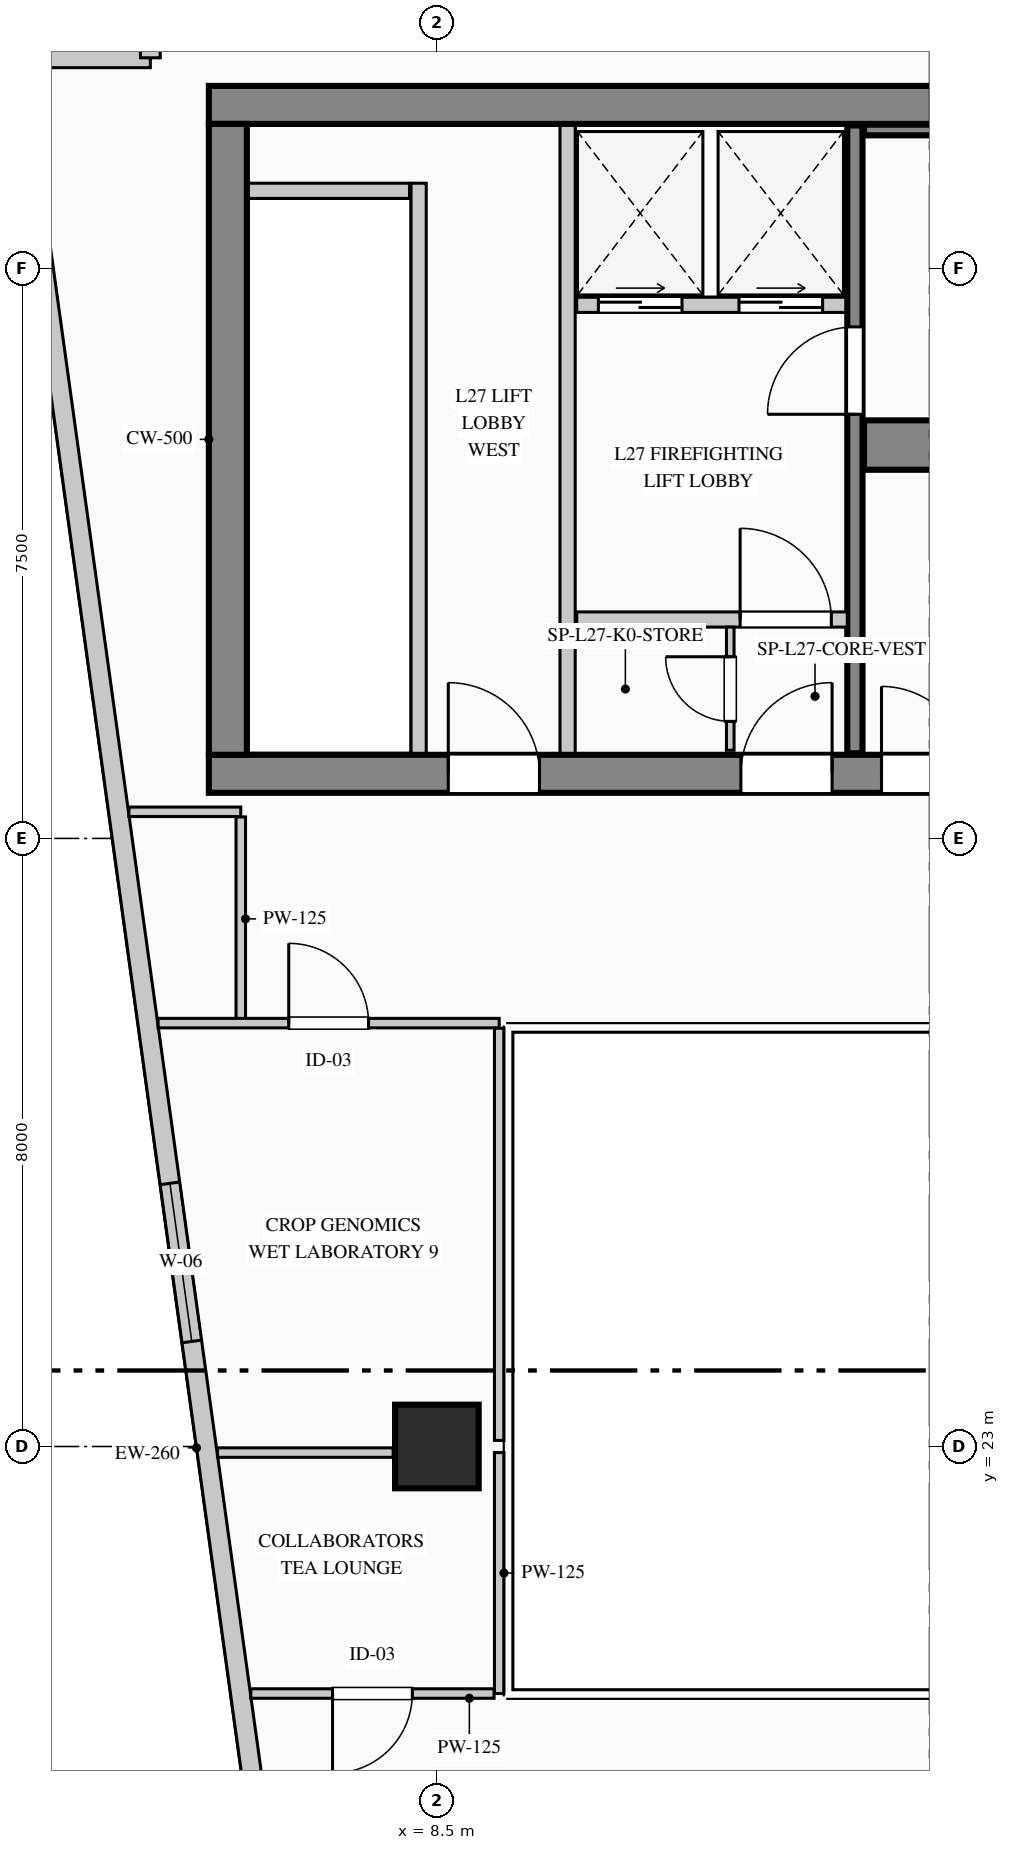
"""IFC4 building model, lengths in metres.
Left out: names, types, materials, properties, quantities, classifications, styles, units other than length and angle.
Written with IfcOpenShell. Run it as: python <this file> out.ifc"""

import sys

from ifc_helpers import new_model, si_unit, direction, frame, frame_2d, origin, origin_2d, place, context, subcontext, project, spatial, rectangle, extrude, element, fill, save


model = new_model("IFC4")
c1 = context("Model", 3, precision=1e-05, world=origin(), true_north=direction((0.0, 1.0)))
c2 = subcontext(c1, "Body", "Model", "MODEL_VIEW")
j1 = project(units=[si_unit("LENGTHUNIT", "METRE"), si_unit("PLANEANGLEUNIT", "RADIAN")], contexts=[c1])
p1 = place(None, origin())
s1 = spatial("IfcSite", under=j1, at=p1, CompositionType="ELEMENT")
p2 = place(p1, origin())
s2 = spatial("IfcBuilding", under=s1, at=p2, CompositionType="ELEMENT")
p3 = place(p2, frame((0.0, 0.0, 119.3)))
s3 = spatial("IfcBuildingStorey", under=s2, at=p3, CompositionType="ELEMENT", Elevation=119.3)
p4 = place(p3, frame((5.5, 40.65, 0.0), z_axis=(0.0, 0.0, 1.0), x_axis=(1.0, 0.0, 0.0)))
e1 = element("IfcWall", 1, at=p4, inside=s3, PredefinedType="SHEAR", context=c2, shape_type="SweptSolid", body=[
    extrude(rectangle(XDim=17.85, YDim=0.5, at=frame_2d((8.925, 0.0))), origin(), (0.0, 0.0, 1.0), 3.95),
])
p5 = place(p4, frame((15.945, 0.0, 0.0)))
e2 = element("IfcOpeningElement", 2, at=p5, cuts=e1, PredefinedType="OPENING", context=c2, shape_type="SweptSolid", body=[
    extrude(rectangle(XDim=1.18, YDim=2.25, at=frame_2d((0.59, 1.125))), frame((0.0, 0.26, 0.0), z_axis=(0.0, -1.0, 0.0), x_axis=(1.0, 0.0, 0.0)), (0.0, 0.0, 1.0), 0.52),
])
p6 = place(p3, frame((5.5, 31.85, 0.0), z_axis=(0.0, 0.0, 1.0), x_axis=(1.0, 0.0, 0.0)))
e3 = element("IfcWall", 3, at=p6, inside=s3, PredefinedType="SHEAR", context=c2, shape_type="SweptSolid", body=[
    extrude(rectangle(XDim=17.85, YDim=0.5, at=frame_2d((8.925, 0.0))), origin(), (0.0, 0.0, 1.0), 3.95),
])
p7 = place(p6, frame((3.15, 0.0, 0.0)))
e4 = element("IfcOpeningElement", 4, at=p7, cuts=e3, PredefinedType="OPENING", context=c2, shape_type="SweptSolid", body=[
    extrude(rectangle(XDim=1.2, YDim=2.2, at=frame_2d((0.6, 1.1))), frame((0.0, 0.26, 0.0), z_axis=(0.0, -1.0, 0.0), x_axis=(1.0, 0.0, 0.0)), (0.0, 0.0, 1.0), 0.52),
])
p8 = place(p6, frame((7.0, 0.0, 0.0)))
e5 = element("IfcOpeningElement", 5, at=p8, cuts=e3, PredefinedType="OPENING", context=c2, shape_type="SweptSolid", body=[
    extrude(rectangle(XDim=1.2, YDim=2.2, at=frame_2d((0.6, 1.1))), frame((0.0, 0.26, 0.0), z_axis=(0.0, -1.0, 0.0), x_axis=(1.0, 0.0, 0.0)), (0.0, 0.0, 1.0), 0.52),
])
p9 = place(p6, frame((8.85, 0.0, 0.0)))
e6 = element("IfcOpeningElement", 6, at=p9, cuts=e3, PredefinedType="OPENING", context=c2, shape_type="SweptSolid", body=[
    extrude(rectangle(XDim=1.15, YDim=2.2, at=frame_2d((0.575, 1.1))), frame((0.0, 0.26, 0.0), z_axis=(0.0, -1.0, 0.0), x_axis=(1.0, 0.0, 0.0)), (0.0, 0.0, 1.0), 0.52),
])
p10 = place(p6, frame((15.95, 0.0, 0.0)))
e7 = element("IfcOpeningElement", 7, at=p10, cuts=e3, PredefinedType="OPENING", context=c2, shape_type="SweptSolid", body=[
    extrude(rectangle(XDim=1.2, YDim=2.2, at=frame_2d((0.6, 1.1))), frame((0.0, 0.26, 0.0), z_axis=(0.0, -1.0, 0.0), x_axis=(1.0, 0.0, 0.0)), (0.0, 0.0, 1.0), 0.52),
])
p11 = place(p3, frame((5.75, 32.1, 0.0), z_axis=(0.0, 0.0, 1.0), x_axis=(0.0, 1.0, 0.0)))
e8 = element("IfcWall", 8, at=p11, inside=s3, PredefinedType="SHEAR", context=c2, shape_type="SweptSolid", body=[
    extrude(rectangle(XDim=8.3, YDim=0.5, at=frame_2d((4.15, 0.0))), origin(), (0.0, 0.0, 1.0), 3.95),
])
p12 = place(p3, frame((14.0, 32.12, 0.0), z_axis=(0.0, 0.0, 1.0), x_axis=(0.0, 1.0, 0.0)))
e9 = element("IfcWall", 9, at=p12, inside=s3, PredefinedType="SHEAR", context=c2, shape_type="SweptSolid", body=[
    extrude(rectangle(XDim=8.26, YDim=0.2, at=frame_2d((4.13, 0.0))), origin(), (0.0, 0.0, 1.0), 3.95),
])
p13 = place(p12, frame((4.46, 0.0, 0.0)))
e10 = element("IfcOpeningElement", 10, at=p13, cuts=e9, PredefinedType="OPENING", context=c2, shape_type="SweptSolid", body=[
    extrude(rectangle(XDim=1.15, YDim=2.2, at=frame_2d((0.575, 1.1))), frame((0.0, 0.11, 0.0), z_axis=(0.0, -1.0, 0.0), x_axis=(1.0, 0.0, 0.0)), (0.0, 0.0, 1.0), 0.22),
])
p14 = place(p3, frame((14.12, 36.175, 0.0), z_axis=(0.0, 0.0, 1.0), x_axis=(1.0, 0.0, 0.0)))
e11 = element("IfcWall", 11, at=p14, inside=s3, PredefinedType="SHEAR", context=c2, shape_type="SweptSolid", body=[
    extrude(rectangle(XDim=7.01, YDim=0.65, at=frame_2d((3.505, 0.0))), origin(), (0.0, 0.0, 1.0), 3.95),
])
p15 = place(p3, frame((14.12, 40.32, 0.0), z_axis=(0.0, 0.0, 1.0), x_axis=(1.0, 0.0, 0.0)))
e12 = element("IfcWall", 12, at=p15, inside=s3, PredefinedType="SHEAR", context=c2, shape_type="SweptSolid", body=[
    extrude(rectangle(XDim=7.01, YDim=0.14, at=frame_2d((3.505, 0.0))), origin(), (0.0, 0.0, 1.0), 3.95),
])
p16 = place(p3, frame((8.5, 23.0, 0.0), z_axis=(0.0, 0.0, 1.0), x_axis=(1.0, 0.0, 0.0)))
e13 = element("IfcColumn", 13, at=p16, inside=s3, PredefinedType="COLUMN", context=c2, shape_type="SweptSolid", body=[
    extrude(rectangle(XDim=1.1, YDim=1.1, at=origin_2d()), origin(), (0.0, 0.0, 1.0), 3.95),
])
p17 = place(p3, frame((7.993, 4.73, 0.0), z_axis=(0.0, 0.0, 1.0), x_axis=(-0.136989009016, 0.990572567462, 0.0)))
e14 = element("IfcWall", 14, at=p17, inside=s3, PredefinedType="STANDARD", context=c2, shape_type="SweptSolid", body=[
    extrude(rectangle(XDim=36.888, YDim=0.26, at=frame_2d((18.444, 0.0))), origin(), (0.0, 0.0, 1.0), 3.69),
])
p18 = place(p17, frame((19.839, 0.0, 0.9)))
e15 = element("IfcOpeningElement", 15, at=p18, cuts=e14, PredefinedType="OPENING", context=c2, shape_type="SweptSolid", body=[
    extrude(rectangle(XDim=2.1, YDim=2.0, at=frame_2d((1.05, 1.0))), frame((0.0, 0.14, 0.0), z_axis=(0.0, -1.0, 0.0), x_axis=(1.0, 0.0, 0.0)), (0.0, 0.0, 1.0), 0.28),
])
p19 = place(p3, frame((2.94, 41.27, 0.0), z_axis=(0.0, 0.0, 1.0), x_axis=(1.0, 0.0, 0.0)))
e16 = element("IfcWall", 16, at=p19, inside=s3, PredefinedType="STANDARD", context=c2, shape_type="SweptSolid", body=[
    extrude(rectangle(XDim=1.79, YDim=0.26, at=frame_2d((0.895, 0.0))), origin(), (0.0, 0.0, 1.0), 3.69),
])
p20 = place(p3, frame((4.73, 41.27, 0.0), z_axis=(0.0, 0.0, 1.0), x_axis=(0.0, 1.0, 0.0)))
e17 = element("IfcWall", 17, at=p20, inside=s3, PredefinedType="STANDARD", context=c2, shape_type="SweptSolid", body=[
    extrude(rectangle(XDim=2.1, YDim=0.26, at=frame_2d((1.05, 0.0))), origin(), (0.0, 0.0, 1.0), 3.69),
])
p21 = place(p3, frame((8.26, 32.12, 0.0), z_axis=(0.0, 0.0, 1.0), x_axis=(0.0, 1.0, 0.0)))
e18 = element("IfcWall", 18, at=p21, inside=s3, PredefinedType="PARTITIONING", context=c2, shape_type="SweptSolid", body=[
    extrude(rectangle(XDim=7.5, YDim=0.2, at=frame_2d((3.75, 0.0))), origin(), (0.0, 0.0, 1.0), 3.69),
])
p22 = place(p3, frame((6.02, 39.52, 0.0), z_axis=(0.0, 0.0, 1.0), x_axis=(1.0, 0.0, 0.0)))
e19 = element("IfcWall", 19, at=p22, inside=s3, PredefinedType="PARTITIONING", context=c2, shape_type="SweptSolid", body=[
    extrude(rectangle(XDim=2.12, YDim=0.2, at=frame_2d((1.06, 0.0))), origin(), (0.0, 0.0, 1.0), 3.69),
])
p23 = place(p3, frame((10.22, 32.12, 0.0), z_axis=(0.0, 0.0, 1.0), x_axis=(0.0, 1.0, 0.0)))
e20 = element("IfcWall", 20, at=p23, inside=s3, PredefinedType="PARTITIONING", context=c2, shape_type="SweptSolid", body=[
    extrude(rectangle(XDim=8.26, YDim=0.2, at=frame_2d((4.13, 0.0))), origin(), (0.0, 0.0, 1.0), 3.69),
])
p24 = place(p3, frame((10.34, 38.02, 0.0), z_axis=(0.0, 0.0, 1.0), x_axis=(1.0, 0.0, 0.0)))
e21 = element("IfcWall", 21, at=p24, inside=s3, PredefinedType="PARTITIONING", context=c2, shape_type="SweptSolid", body=[
    extrude(rectangle(XDim=3.54, YDim=0.2, at=frame_2d((1.77, 0.0))), origin(), (0.0, 0.0, 1.0), 3.69),
])
p25 = place(p24, frame((0.285, 0.0, 0.0)))
e22 = element("IfcOpeningElement", 22, at=p25, cuts=e21, PredefinedType="OPENING", context=c2, shape_type="SweptSolid", body=[
    extrude(rectangle(XDim=1.1, YDim=2.2, at=frame_2d((0.55, 1.1))), frame((0.0, 0.11, 0.0), z_axis=(0.0, -1.0, 0.0), x_axis=(1.0, 0.0, 0.0)), (0.0, 0.0, 1.0), 0.22),
])
p26 = place(p24, frame((2.135, 0.0, 0.0)))
e23 = element("IfcOpeningElement", 23, at=p26, cuts=e21, PredefinedType="OPENING", context=c2, shape_type="SweptSolid", body=[
    extrude(rectangle(XDim=1.1, YDim=2.2, at=frame_2d((0.55, 1.1))), frame((0.0, 0.11, 0.0), z_axis=(0.0, -1.0, 0.0), x_axis=(1.0, 0.0, 0.0)), (0.0, 0.0, 1.0), 0.22),
])
p27 = place(p3, frame((10.34, 33.88, 0.0), z_axis=(0.0, 0.0, 1.0), x_axis=(1.0, 0.0, 0.0)))
e24 = element("IfcWall", 24, at=p27, inside=s3, PredefinedType="PARTITIONING", context=c2, shape_type="SweptSolid", body=[
    extrude(rectangle(XDim=3.56, YDim=0.2, at=frame_2d((1.78, 0.0))), origin(), (0.0, 0.0, 1.0), 3.69),
])
p28 = place(p27, frame((2.15, 0.0, 0.0)))
e25 = element("IfcOpeningElement", 25, at=p28, cuts=e24, PredefinedType="OPENING", context=c2, shape_type="SweptSolid", body=[
    extrude(rectangle(XDim=1.2, YDim=2.2, at=frame_2d((0.6, 1.1))), frame((0.0, 0.11, 0.0), z_axis=(0.0, -1.0, 0.0), x_axis=(1.0, 0.0, 0.0)), (0.0, 0.0, 1.0), 0.22),
])
p29 = place(p3, frame((12.36, 32.16, 0.0), z_axis=(0.0, 0.0, 1.0), x_axis=(0.0, 1.0, 0.0)))
e26 = element("IfcWall", 26, at=p29, inside=s3, PredefinedType="PARTITIONING", context=c2, shape_type="SweptSolid", body=[
    extrude(rectangle(XDim=1.62, YDim=0.1, at=frame_2d((0.81, 0.0))), origin(), (0.0, 0.0, 1.0), 3.69),
])
p30 = place(p29, frame((0.38, 0.0, 0.0)))
e27 = element("IfcOpeningElement", 27, at=p30, cuts=e26, PredefinedType="OPENING", context=c2, shape_type="SweptSolid", body=[
    extrude(rectangle(XDim=0.85, YDim=2.1, at=frame_2d((0.425, 1.05))), frame((0.0, 0.06, 0.0), z_axis=(0.0, -1.0, 0.0), x_axis=(1.0, 0.0, 0.0)), (0.0, 0.0, 1.0), 0.12),
])
p31 = place(p3, frame((9.32, 22.92, 0.0), z_axis=(0.0, 0.0, 1.0), x_axis=(0.0, -1.0, 0.0)))
e28 = element("IfcWall", 28, at=p31, inside=s3, PredefinedType="PARTITIONING", context=c2, shape_type="SweptSolid", body=[
    extrude(rectangle(XDim=3.17, YDim=0.125, at=frame_2d((1.585, 0.0))), origin(), (0.0, 0.0, 1.0), 3.315),
])
p32 = place(p3, frame((9.252, 19.75, 0.0), z_axis=(0.0, 0.0, 1.0), x_axis=(-1.0, 0.0, 0.0)))
e29 = element("IfcWall", 29, at=p32, inside=s3, PredefinedType="PARTITIONING", context=c2, shape_type="SweptSolid", body=[
    extrude(rectangle(XDim=3.2, YDim=0.125, at=frame_2d((1.6, 0.0))), origin(), (0.0, 0.0, 1.0), 3.69),
])
p33 = place(p32, frame((1.075, 0.0, 0.0)))
e30 = element("IfcOpeningElement", 30, at=p33, cuts=e29, PredefinedType="OPENING", context=c2, shape_type="SweptSolid", body=[
    extrude(rectangle(XDim=1.05, YDim=2.15, at=frame_2d((0.525, 1.075))), frame((0.0, 0.073, 0.0), z_axis=(0.0, -1.0, 0.0), x_axis=(1.0, 0.0, 0.0)), (0.0, 0.0, 1.0), 0.145),
])
p34 = place(p3, frame((5.614, 22.92, 0.0), z_axis=(0.0, 0.0, 1.0), x_axis=(1.0, 0.0, 0.0)))
e31 = element("IfcWall", 31, at=p34, inside=s3, PredefinedType="PARTITIONING", context=c2, shape_type="SweptSolid", body=[
    extrude(rectangle(XDim=2.312, YDim=0.125, at=frame_2d((1.156, 0.0))), origin(), (0.0, 0.0, 1.0), 3.69),
])
p35 = place(p3, frame((4.448, 31.35, 0.0), z_axis=(0.0, 0.0, 1.0), x_axis=(1.0, 0.0, 0.0)))
e32 = element("IfcWall", 32, at=p35, inside=s3, PredefinedType="PARTITIONING", context=c2, shape_type="SweptSolid", body=[
    extrude(rectangle(XDim=1.472, YDim=0.125, at=frame_2d((0.736, 0.0))), origin(), (0.0, 0.0, 1.0), 3.69),
])
p36 = place(p3, frame((5.92, 31.282, 0.0), z_axis=(0.0, 0.0, 1.0), x_axis=(0.0, -1.0, 0.0)))
e33 = element("IfcWall", 33, at=p36, inside=s3, PredefinedType="PARTITIONING", context=c2, shape_type="SweptSolid", body=[
    extrude(rectangle(XDim=2.682, YDim=0.125, at=frame_2d((1.341, 0.0))), origin(), (0.0, 0.0, 1.0), 3.69),
])
p37 = place(p3, frame((4.832, 28.57, 0.0), z_axis=(0.0, 0.0, 1.0), x_axis=(1.0, 0.0, 0.0)))
e34 = element("IfcWall", 34, at=p37, inside=s3, PredefinedType="PARTITIONING", context=c2, shape_type="SweptSolid", body=[
    extrude(rectangle(XDim=4.488, YDim=0.125, at=frame_2d((2.244, 0.0))), origin(), (0.0, 0.0, 1.0), 3.69),
])
p38 = place(p37, frame((1.719, 0.0, 0.0)))
e35 = element("IfcOpeningElement", 35, at=p38, cuts=e34, PredefinedType="OPENING", context=c2, shape_type="SweptSolid", body=[
    extrude(rectangle(XDim=1.05, YDim=2.15, at=frame_2d((0.525, 1.075))), frame((0.0, 0.073, 0.0), z_axis=(0.0, -1.0, 0.0), x_axis=(1.0, 0.0, 0.0)), (0.0, 0.0, 1.0), 0.145),
])
p39 = place(p3, frame((9.32, 28.502, 0.0), z_axis=(0.0, 0.0, 1.0), x_axis=(0.0, -1.0, 0.0)))
e36 = element("IfcWall", 36, at=p39, inside=s3, PredefinedType="PARTITIONING", context=c2, shape_type="SweptSolid", body=[
    extrude(rectangle(XDim=5.422, YDim=0.125, at=frame_2d((2.711, 0.0))), origin(), (0.0, 0.0, 1.0), 3.315),
])
p40 = place(p18, origin())
e37 = element("IfcWindow", 37, at=p40, inside=s3, PartitioningType="DOUBLE_PANEL_VERTICAL", PredefinedType="WINDOW", context=c2, shape_type="SweptSolid", body=[
    extrude(rectangle(XDim=2.1, YDim=2.0, at=frame_2d((1.05, 1.0))), frame((0.0, 0.03, 0.0), z_axis=(0.0, -1.0, 0.0), x_axis=(1.0, 0.0, 0.0)), (0.0, 0.0, 1.0), 0.06),
])
fill(e15, e37)
p41 = place(p7, origin())
e38 = element("IfcDoor", 38, at=p41, inside=s3, OperationType="SINGLE_SWING_LEFT", PredefinedType="DOOR", context=c2, shape_type="SweptSolid", body=[
    extrude(rectangle(XDim=1.2, YDim=2.2, at=frame_2d((0.6, 1.1))), frame((0.0, 0.025, 0.0), z_axis=(0.0, -1.0, 0.0), x_axis=(1.0, 0.0, 0.0)), (0.0, 0.0, 1.0), 0.05),
])
fill(e4, e38)
p42 = place(p8, origin())
e39 = element("IfcDoor", 39, at=p42, inside=s3, OperationType="SINGLE_SWING_RIGHT", PredefinedType="DOOR", context=c2, shape_type="SweptSolid", body=[
    extrude(rectangle(XDim=1.2, YDim=2.2, at=frame_2d((0.6, 1.1))), frame((0.0, 0.025, 0.0), z_axis=(0.0, -1.0, 0.0), x_axis=(1.0, 0.0, 0.0)), (0.0, 0.0, 1.0), 0.05),
])
fill(e5, e39)
p43 = place(p9, origin())
e40 = element("IfcDoor", 40, at=p43, inside=s3, OperationType="SINGLE_SWING_LEFT", PredefinedType="DOOR", context=c2, shape_type="SweptSolid", body=[
    extrude(rectangle(XDim=1.15, YDim=2.2, at=frame_2d((0.575, 1.1))), frame((0.0, 0.025, 0.0), z_axis=(0.0, -1.0, 0.0), x_axis=(1.0, 0.0, 0.0)), (0.0, 0.0, 1.0), 0.05),
])
fill(e6, e40)
p44 = place(p28, origin())
e41 = element("IfcDoor", 41, at=p44, inside=s3, OperationType="SINGLE_SWING_LEFT", PredefinedType="DOOR", context=c2, shape_type="SweptSolid", body=[
    extrude(rectangle(XDim=1.2, YDim=2.2, at=frame_2d((0.6, 1.1))), frame((0.0, 0.025, 0.0), z_axis=(0.0, -1.0, 0.0), x_axis=(1.0, 0.0, 0.0)), (0.0, 0.0, 1.0), 0.05),
])
fill(e25, e41)
p45 = place(p30, origin())
e42 = element("IfcDoor", 42, at=p45, inside=s3, OperationType="SINGLE_SWING_RIGHT", PredefinedType="DOOR", context=c2, shape_type="SweptSolid", body=[
    extrude(rectangle(XDim=0.85, YDim=2.1, at=frame_2d((0.425, 1.05))), frame((0.0, 0.025, 0.0), z_axis=(0.0, -1.0, 0.0), x_axis=(1.0, 0.0, 0.0)), (0.0, 0.0, 1.0), 0.05),
])
fill(e27, e42)
p46 = place(p13, origin())
e43 = element("IfcDoor", 43, at=p46, inside=s3, OperationType="SINGLE_SWING_LEFT", PredefinedType="DOOR", context=c2, shape_type="SweptSolid", body=[
    extrude(rectangle(XDim=1.15, YDim=2.2, at=frame_2d((0.575, 1.1))), frame((0.0, 0.025, 0.0), z_axis=(0.0, -1.0, 0.0), x_axis=(1.0, 0.0, 0.0)), (0.0, 0.0, 1.0), 0.05),
])
fill(e10, e43)
p47 = place(p25, origin())
e44 = element("IfcDoor", 44, at=p47, inside=s3, OperationType="DOUBLE_DOOR_SLIDING", PredefinedType="DOOR", context=c2, shape_type="SweptSolid", body=[
    extrude(rectangle(XDim=1.1, YDim=2.2, at=frame_2d((0.55, 1.1))), frame((0.0, 0.025, 0.0), z_axis=(0.0, -1.0, 0.0), x_axis=(1.0, 0.0, 0.0)), (0.0, 0.0, 1.0), 0.05),
])
fill(e22, e44)
p48 = place(p26, origin())
e45 = element("IfcDoor", 45, at=p48, inside=s3, OperationType="DOUBLE_DOOR_SLIDING", PredefinedType="DOOR", context=c2, shape_type="SweptSolid", body=[
    extrude(rectangle(XDim=1.1, YDim=2.2, at=frame_2d((0.55, 1.1))), frame((0.0, 0.025, 0.0), z_axis=(0.0, -1.0, 0.0), x_axis=(1.0, 0.0, 0.0)), (0.0, 0.0, 1.0), 0.05),
])
fill(e23, e45)
p49 = place(p33, origin())
e46 = element("IfcDoor", 46, at=p49, inside=s3, OperationType="SINGLE_SWING_RIGHT", PredefinedType="DOOR", context=c2, shape_type="SweptSolid", body=[
    extrude(rectangle(XDim=1.05, YDim=2.15, at=frame_2d((0.525, 1.075))), frame((0.0, 0.025, 0.0), z_axis=(0.0, -1.0, 0.0), x_axis=(1.0, 0.0, 0.0)), (0.0, 0.0, 1.0), 0.05),
])
fill(e30, e46)
p50 = place(p38, origin())
e47 = element("IfcDoor", 47, at=p50, inside=s3, OperationType="SINGLE_SWING_LEFT", PredefinedType="DOOR", context=c2, shape_type="SweptSolid", body=[
    extrude(rectangle(XDim=1.05, YDim=2.15, at=frame_2d((0.525, 1.075))), frame((0.0, 0.025, 0.0), z_axis=(0.0, -1.0, 0.0), x_axis=(1.0, 0.0, 0.0)), (0.0, 0.0, 1.0), 0.05),
])
fill(e35, e47)
save(model, sys.argv[1])
